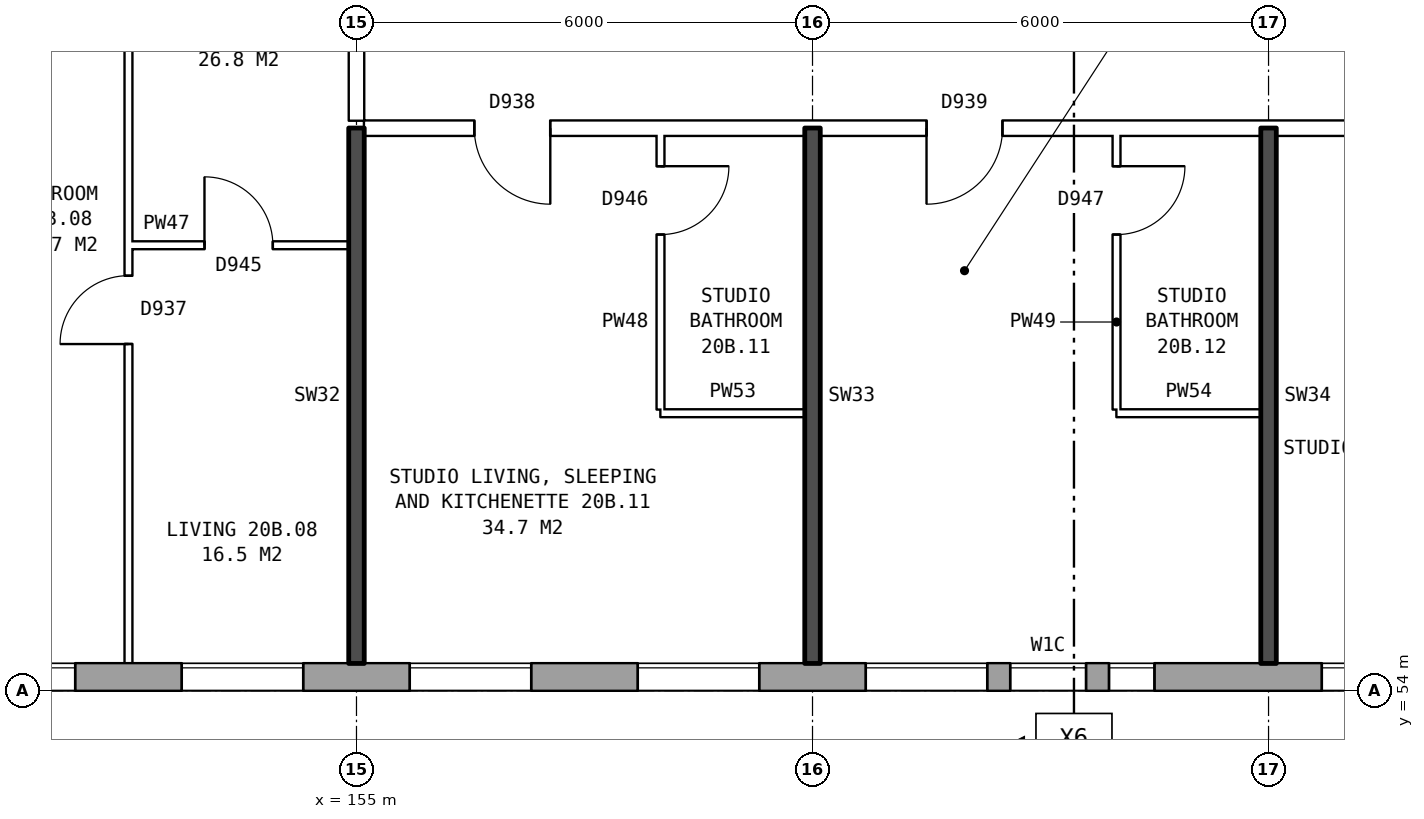
"""IFC4 building model, lengths in metres.
Left out: names, types, materials, properties, quantities, classifications, styles, units other than length and angle.
Written with IfcOpenShell. Run it as: python <this file> out.ifc"""

import sys

from ifc_helpers import new_model, si_unit, direction, frame, frame_2d, origin, place, context, subcontext, project, spatial, rectangle, extrude, element, fill, save


model = new_model("IFC4")
c1 = context("Model", 3, precision=1e-05, world=origin(), true_north=direction((0.0, 1.0)))
c2 = subcontext(c1, "Body", "Model", "MODEL_VIEW")
j1 = project(units=[si_unit("LENGTHUNIT", "METRE"), si_unit("PLANEANGLEUNIT", "RADIAN")], contexts=[c1])
p1 = place(None, origin())
s1 = spatial("IfcSite", under=j1, at=p1, CompositionType="ELEMENT")
p2 = place(p1, origin())
s2 = spatial("IfcBuilding", under=s1, at=p2, CompositionType="ELEMENT")
p3 = place(p2, frame((0.0, 0.0, 74.7)))
s3 = spatial("IfcBuildingStorey", under=s2, at=p3, CompositionType="ELEMENT", Elevation=74.7)
p4 = place(p3, frame((134.075, 54.18, 0.0), z_axis=(0.0, 0.0, 1.0), x_axis=(1.0, 0.0, 0.0)))
e1 = element("IfcWall", 1, at=p4, inside=s3, PredefinedType="STANDARD", context=c2, shape_type="SweptSolid", body=[
    extrude(rectangle(XDim=38.101, YDim=0.36, at=frame_2d((19.05, 0.0))), origin(), (0.0, 0.0, 1.0), 2.85),
])
p5 = place(p4, frame((0.625, 0.0, 0.8)))
e2 = element("IfcOpeningElement", 2, at=p5, cuts=e1, PredefinedType="OPENING", context=c2, shape_type="SweptSolid", body=[
    extrude(rectangle(XDim=1.6, YDim=1.8, at=frame_2d((0.8, 0.9))), frame((0.0, 0.19, 0.0), z_axis=(0.0, -1.0, 0.0), x_axis=(1.0, 0.0, 0.0)), (0.0, 0.0, 1.0), 0.38),
])
p6 = place(p4, frame((3.125, 0.0, 0.8)))
e3 = element("IfcOpeningElement", 3, at=p6, cuts=e1, PredefinedType="OPENING", context=c2, shape_type="SweptSolid", body=[
    extrude(rectangle(XDim=1.2, YDim=1.8, at=frame_2d((0.6, 0.9))), frame((0.0, 0.19, 0.0), z_axis=(0.0, -1.0, 0.0), x_axis=(1.0, 0.0, 0.0)), (0.0, 0.0, 1.0), 0.38),
])
p7 = place(p4, frame((4.625, 0.0, 1.6)))
e4 = element("IfcOpeningElement", 4, at=p7, cuts=e1, PredefinedType="OPENING", context=c2, shape_type="SweptSolid", body=[
    extrude(rectangle(XDim=0.6, YDim=0.9, at=frame_2d((0.3, 0.45))), frame((0.0, 0.19, 0.0), z_axis=(0.0, -1.0, 0.0), x_axis=(1.0, 0.0, 0.0)), (0.0, 0.0, 1.0), 0.38),
])
p8 = place(p4, frame((9.625, 0.0, 0.8)))
e5 = element("IfcOpeningElement", 5, at=p8, cuts=e1, PredefinedType="OPENING", context=c2, shape_type="SweptSolid", body=[
    extrude(rectangle(XDim=1.6, YDim=1.8, at=frame_2d((0.8, 0.9))), frame((0.0, 0.19, 0.0), z_axis=(0.0, -1.0, 0.0), x_axis=(1.0, 0.0, 0.0)), (0.0, 0.0, 1.0), 0.38),
])
p9 = place(p4, frame((12.625, 0.0, 0.8)))
e6 = element("IfcOpeningElement", 6, at=p9, cuts=e1, PredefinedType="OPENING", context=c2, shape_type="SweptSolid", body=[
    extrude(rectangle(XDim=1.6, YDim=1.8, at=frame_2d((0.8, 0.9))), frame((0.0, 0.19, 0.0), z_axis=(0.0, -1.0, 0.0), x_axis=(1.0, 0.0, 0.0)), (0.0, 0.0, 1.0), 0.38),
])
p10 = place(p4, frame((15.625, 0.0, 0.8)))
e7 = element("IfcOpeningElement", 7, at=p10, cuts=e1, PredefinedType="OPENING", context=c2, shape_type="SweptSolid", body=[
    extrude(rectangle(XDim=1.6, YDim=1.8, at=frame_2d((0.8, 0.9))), frame((0.0, 0.19, 0.0), z_axis=(0.0, -1.0, 0.0), x_axis=(1.0, 0.0, 0.0)), (0.0, 0.0, 1.0), 0.38),
])
p11 = place(p4, frame((18.625, 0.0, 0.8)))
e8 = element("IfcOpeningElement", 8, at=p11, cuts=e1, PredefinedType="OPENING", context=c2, shape_type="SweptSolid", body=[
    extrude(rectangle(XDim=1.6, YDim=1.8, at=frame_2d((0.8, 0.9))), frame((0.0, 0.19, 0.0), z_axis=(0.0, -1.0, 0.0), x_axis=(1.0, 0.0, 0.0)), (0.0, 0.0, 1.0), 0.38),
])
p12 = place(p4, frame((21.625, 0.0, 0.8)))
e9 = element("IfcOpeningElement", 9, at=p12, cuts=e1, PredefinedType="OPENING", context=c2, shape_type="SweptSolid", body=[
    extrude(rectangle(XDim=1.6, YDim=1.8, at=frame_2d((0.8, 0.9))), frame((0.0, 0.19, 0.0), z_axis=(0.0, -1.0, 0.0), x_axis=(1.0, 0.0, 0.0)), (0.0, 0.0, 1.0), 0.38),
])
p13 = place(p4, frame((24.625, 0.0, 0.8)))
e10 = element("IfcOpeningElement", 10, at=p13, cuts=e1, PredefinedType="OPENING", context=c2, shape_type="SweptSolid", body=[
    extrude(rectangle(XDim=1.6, YDim=1.8, at=frame_2d((0.8, 0.9))), frame((0.0, 0.19, 0.0), z_axis=(0.0, -1.0, 0.0), x_axis=(1.0, 0.0, 0.0)), (0.0, 0.0, 1.0), 0.38),
])
p14 = place(p4, frame((27.625, 0.0, 0.8)))
e11 = element("IfcOpeningElement", 11, at=p14, cuts=e1, PredefinedType="OPENING", context=c2, shape_type="SweptSolid", body=[
    extrude(rectangle(XDim=1.6, YDim=1.8, at=frame_2d((0.8, 0.9))), frame((0.0, 0.19, 0.0), z_axis=(0.0, -1.0, 0.0), x_axis=(1.0, 0.0, 0.0)), (0.0, 0.0, 1.0), 0.38),
])
p15 = place(p4, frame((29.525, 0.0, 0.8)))
e12 = element("IfcOpeningElement", 12, at=p15, cuts=e1, PredefinedType="OPENING", context=c2, shape_type="SweptSolid", body=[
    extrude(rectangle(XDim=1.0, YDim=1.8, at=frame_2d((0.5, 0.9))), frame((0.0, 0.19, 0.0), z_axis=(0.0, -1.0, 0.0), x_axis=(1.0, 0.0, 0.0)), (0.0, 0.0, 1.0), 0.38),
])
p16 = place(p4, frame((33.625, 0.0, 0.8)))
e13 = element("IfcOpeningElement", 13, at=p16, cuts=e1, PredefinedType="OPENING", context=c2, shape_type="SweptSolid", body=[
    extrude(rectangle(XDim=1.6, YDim=1.8, at=frame_2d((0.8, 0.9))), frame((0.0, 0.19, 0.0), z_axis=(0.0, -1.0, 0.0), x_axis=(1.0, 0.0, 0.0)), (0.0, 0.0, 1.0), 0.38),
])
p17 = place(p4, frame((6.525, 0.0, 0.8)))
e14 = element("IfcOpeningElement", 14, at=p17, cuts=e1, PredefinedType="OPENING", context=c2, shape_type="SweptSolid", body=[
    extrude(rectangle(XDim=0.6, YDim=0.9, at=frame_2d((0.3, 0.45))), frame((0.0, 0.19, 0.0), z_axis=(0.0, -1.0, 0.0), x_axis=(1.0, 0.0, 0.0)), (0.0, 0.0, 1.0), 0.38),
])
p18 = place(p4, frame((7.425, 0.0, 0.8)))
e15 = element("IfcOpeningElement", 15, at=p18, cuts=e1, PredefinedType="OPENING", context=c2, shape_type="SweptSolid", body=[
    extrude(rectangle(XDim=1.2, YDim=1.8, at=frame_2d((0.6, 0.9))), frame((0.0, 0.19, 0.0), z_axis=(0.0, -1.0, 0.0), x_axis=(1.0, 0.0, 0.0)), (0.0, 0.0, 1.0), 0.38),
])
p19 = place(p4, frame((30.825, 0.0, 0.8)))
e16 = element("IfcOpeningElement", 16, at=p19, cuts=e1, PredefinedType="OPENING", context=c2, shape_type="SweptSolid", body=[
    extrude(rectangle(XDim=0.6, YDim=0.9, at=frame_2d((0.3, 0.45))), frame((0.0, 0.19, 0.0), z_axis=(0.0, -1.0, 0.0), x_axis=(1.0, 0.0, 0.0)), (0.0, 0.0, 1.0), 0.38),
])
for number, where, z_axis, x_axis in (
    (17, (159.0, 57.65, 0.0), (0.0, 0.0, 1.0), (1.0, 0.0, 0.0)),
    (18, (165.0, 57.65, 0.0), (0.0, 0.0, 1.0), (1.0, 0.0, 0.0)),
):
    element("IfcWall", number, at=place(p3, frame(where, z_axis=z_axis, x_axis=x_axis)), inside=s3, PredefinedType="PARTITIONING", context=c2, shape_type="SweptSolid", body=[
        extrude(rectangle(XDim=1.9, YDim=0.1, at=frame_2d((0.95, 0.0))), origin(), (0.0, 0.0, 1.0), 2.85),
    ])
p20 = place(p3, frame((152.0, 59.86, 0.0), z_axis=(0.0, 0.0, 1.0), x_axis=(1.0, 0.0, 0.0)))
e19 = element("IfcWall", 19, at=p20, inside=s3, PredefinedType="PARTITIONING", context=c2, shape_type="SweptSolid", body=[
    extrude(rectangle(XDim=2.9, YDim=0.1, at=frame_2d((1.45, 0.0))), origin(), (0.0, 0.0, 1.0), 2.85),
])
p21 = place(p20, frame((1.0, 0.0, 0.0)))
e20 = element("IfcOpeningElement", 20, at=p21, cuts=e19, PredefinedType="OPENING", context=c2, shape_type="SweptSolid", body=[
    extrude(rectangle(XDim=0.9, YDim=2.1, at=frame_2d((0.45, 1.05))), frame((0.0, 0.06, 0.0), z_axis=(0.0, -1.0, 0.0), x_axis=(1.0, 0.0, 0.0)), (0.0, 0.0, 1.0), 0.12),
])
p22 = place(p3, frame((155.1, 61.4, 0.0), z_axis=(0.0, 0.0, 1.0), x_axis=(1.0, 0.0, 0.0)))
e21 = element("IfcWall", 21, at=p22, inside=s3, PredefinedType="PARTITIONING", context=c2, shape_type="SweptSolid", body=[
    extrude(rectangle(XDim=19.79, YDim=0.2, at=frame_2d((9.895, 0.0))), origin(), (0.0, 0.0, 1.0), 2.85),
])
p23 = place(p22, frame((1.45, 0.0, 0.0)))
e22 = element("IfcOpeningElement", 22, at=p23, cuts=e21, PredefinedType="OPENING", context=c2, shape_type="SweptSolid", body=[
    extrude(rectangle(XDim=1.0, YDim=2.1, at=frame_2d((0.5, 1.05))), frame((0.0, 0.11, 0.0), z_axis=(0.0, -1.0, 0.0), x_axis=(1.0, 0.0, 0.0)), (0.0, 0.0, 1.0), 0.22),
])
p24 = place(p22, frame((7.4, 0.0, 0.0)))
e23 = element("IfcOpeningElement", 23, at=p24, cuts=e21, PredefinedType="OPENING", context=c2, shape_type="SweptSolid", body=[
    extrude(rectangle(XDim=1.0, YDim=2.1, at=frame_2d((0.5, 1.05))), frame((0.0, 0.11, 0.0), z_axis=(0.0, -1.0, 0.0), x_axis=(1.0, 0.0, 0.0)), (0.0, 0.0, 1.0), 0.22),
])
p25 = place(p22, frame((13.2, 0.0, 0.0)))
e24 = element("IfcOpeningElement", 24, at=p25, cuts=e21, PredefinedType="OPENING", context=c2, shape_type="SweptSolid", body=[
    extrude(rectangle(XDim=1.0, YDim=2.1, at=frame_2d((0.5, 1.05))), frame((0.0, 0.11, 0.0), z_axis=(0.0, -1.0, 0.0), x_axis=(1.0, 0.0, 0.0)), (0.0, 0.0, 1.0), 0.22),
])
p26 = place(p3, frame((152.0, 54.36, 0.0), z_axis=(0.0, 0.0, 1.0), x_axis=(0.0, 1.0, 0.0)))
e25 = element("IfcWall", 25, at=p26, inside=s3, PredefinedType="PARTITIONING", context=c2, shape_type="SweptSolid", body=[
    extrude(rectangle(XDim=14.34, YDim=0.1, at=frame_2d((7.17, 0.0))), origin(), (0.0, 0.0, 1.0), 2.85),
])
p27 = place(p26, frame((4.2, 0.0, 0.0)))
e26 = element("IfcOpeningElement", 26, at=p27, cuts=e25, PredefinedType="OPENING", context=c2, shape_type="SweptSolid", body=[
    extrude(rectangle(XDim=0.9, YDim=2.1, at=frame_2d((0.45, 1.05))), frame((0.0, 0.06, 0.0), z_axis=(0.0, -1.0, 0.0), x_axis=(1.0, 0.0, 0.0)), (0.0, 0.0, 1.0), 0.12),
])
p28 = place(p26, frame((13.04, 0.0, 0.0)))
e27 = element("IfcOpeningElement", 27, at=p28, cuts=e25, PredefinedType="OPENING", context=c2, shape_type="SweptSolid", body=[
    extrude(rectangle(XDim=0.9, YDim=2.1, at=frame_2d((0.45, 1.05))), frame((0.0, 0.06, 0.0), z_axis=(0.0, -1.0, 0.0), x_axis=(1.0, 0.0, 0.0)), (0.0, 0.0, 1.0), 0.12),
])
p29 = place(p3, frame((155.0, 54.36, 0.0), z_axis=(0.0, 0.0, 1.0), x_axis=(0.0, 1.0, 0.0)))
e28 = element("IfcWall", 28, at=p29, inside=s3, PredefinedType="SOLIDWALL", context=c2, shape_type="SweptSolid", body=[
    extrude(rectangle(XDim=7.04, YDim=0.2, at=frame_2d((3.52, 0.0))), origin(), (0.0, 0.0, 1.0), 2.85),
])
p30 = place(p3, frame((155.0, 61.5, 0.0), z_axis=(0.0, 0.0, 1.0), x_axis=(0.0, 1.0, 0.0)))
e29 = element("IfcWall", 29, at=p30, inside=s3, PredefinedType="PARTITIONING", context=c2, shape_type="SweptSolid", body=[
    extrude(rectangle(XDim=2.2, YDim=0.2, at=frame_2d((1.1, 0.0))), origin(), (0.0, 0.0, 1.0), 2.85),
])
p31 = place(p3, frame((159.0, 57.7, 0.0), z_axis=(0.0, 0.0, 1.0), x_axis=(0.0, 1.0, 0.0)))
e30 = element("IfcWall", 30, at=p31, inside=s3, PredefinedType="PARTITIONING", context=c2, shape_type="SweptSolid", body=[
    extrude(rectangle(XDim=3.6, YDim=0.1, at=frame_2d((1.8, 0.0))), origin(), (0.0, 0.0, 1.0), 2.85),
])
p32 = place(p31, frame((2.3, 0.0, 0.0)))
e31 = element("IfcOpeningElement", 31, at=p32, cuts=e30, PredefinedType="OPENING", context=c2, shape_type="SweptSolid", body=[
    extrude(rectangle(XDim=0.9, YDim=2.1, at=frame_2d((0.45, 1.05))), frame((0.0, 0.06, 0.0), z_axis=(0.0, -1.0, 0.0), x_axis=(1.0, 0.0, 0.0)), (0.0, 0.0, 1.0), 0.12),
])
p33 = place(p3, frame((161.0, 54.36, 0.0), z_axis=(0.0, 0.0, 1.0), x_axis=(0.0, 1.0, 0.0)))
e32 = element("IfcWall", 32, at=p33, inside=s3, PredefinedType="SOLIDWALL", context=c2, shape_type="SweptSolid", body=[
    extrude(rectangle(XDim=7.04, YDim=0.2, at=frame_2d((3.52, 0.0))), origin(), (0.0, 0.0, 1.0), 2.85),
])
p34 = place(p3, frame((165.0, 57.7, 0.0), z_axis=(0.0, 0.0, 1.0), x_axis=(0.0, 1.0, 0.0)))
e33 = element("IfcWall", 33, at=p34, inside=s3, PredefinedType="PARTITIONING", context=c2, shape_type="SweptSolid", body=[
    extrude(rectangle(XDim=3.6, YDim=0.1, at=frame_2d((1.8, 0.0))), origin(), (0.0, 0.0, 1.0), 2.85),
])
p35 = place(p34, frame((2.3, 0.0, 0.0)))
e34 = element("IfcOpeningElement", 34, at=p35, cuts=e33, PredefinedType="OPENING", context=c2, shape_type="SweptSolid", body=[
    extrude(rectangle(XDim=0.9, YDim=2.1, at=frame_2d((0.45, 1.05))), frame((0.0, 0.06, 0.0), z_axis=(0.0, -1.0, 0.0), x_axis=(1.0, 0.0, 0.0)), (0.0, 0.0, 1.0), 0.12),
])
p36 = place(p3, frame((167.0, 54.36, 0.0), z_axis=(0.0, 0.0, 1.0), x_axis=(0.0, 1.0, 0.0)))
e35 = element("IfcWall", 35, at=p36, inside=s3, PredefinedType="SOLIDWALL", context=c2, shape_type="SweptSolid", body=[
    extrude(rectangle(XDim=7.04, YDim=0.2, at=frame_2d((3.52, 0.0))), origin(), (0.0, 0.0, 1.0), 2.85),
])
p37 = place(p10, origin())
e36 = element("IfcWindow", 36, at=p37, inside=s3, PartitioningType="SINGLE_PANEL", PredefinedType="WINDOW", context=c2, shape_type="SweptSolid", body=[
    extrude(rectangle(XDim=1.6, YDim=1.8, at=frame_2d((0.8, 0.9))), frame((0.0, 0.15, 0.0), z_axis=(0.0, -1.0, 0.0), x_axis=(1.0, 0.0, 0.0)), (0.0, 0.0, 1.0), 0.06),
])
fill(e7, e36)
p38 = place(p11, origin())
e37 = element("IfcWindow", 37, at=p38, inside=s3, PartitioningType="SINGLE_PANEL", PredefinedType="WINDOW", context=c2, shape_type="SweptSolid", body=[
    extrude(rectangle(XDim=1.6, YDim=1.8, at=frame_2d((0.8, 0.9))), frame((0.0, 0.15, 0.0), z_axis=(0.0, -1.0, 0.0), x_axis=(1.0, 0.0, 0.0)), (0.0, 0.0, 1.0), 0.06),
])
fill(e8, e37)
p39 = place(p12, origin())
e38 = element("IfcWindow", 38, at=p39, inside=s3, PartitioningType="SINGLE_PANEL", PredefinedType="WINDOW", context=c2, shape_type="SweptSolid", body=[
    extrude(rectangle(XDim=1.6, YDim=1.8, at=frame_2d((0.8, 0.9))), frame((0.0, 0.15, 0.0), z_axis=(0.0, -1.0, 0.0), x_axis=(1.0, 0.0, 0.0)), (0.0, 0.0, 1.0), 0.06),
])
fill(e9, e38)
p40 = place(p13, origin())
e39 = element("IfcWindow", 39, at=p40, inside=s3, PartitioningType="SINGLE_PANEL", PredefinedType="WINDOW", context=c2, shape_type="SweptSolid", body=[
    extrude(rectangle(XDim=1.6, YDim=1.8, at=frame_2d((0.8, 0.9))), frame((0.0, 0.15, 0.0), z_axis=(0.0, -1.0, 0.0), x_axis=(1.0, 0.0, 0.0)), (0.0, 0.0, 1.0), 0.06),
])
fill(e10, e39)
p41 = place(p14, origin())
e40 = element("IfcWindow", 40, at=p41, inside=s3, PartitioningType="SINGLE_PANEL", PredefinedType="WINDOW", context=c2, shape_type="SweptSolid", body=[
    extrude(rectangle(XDim=1.6, YDim=1.8, at=frame_2d((0.8, 0.9))), frame((0.0, 0.15, 0.0), z_axis=(0.0, -1.0, 0.0), x_axis=(1.0, 0.0, 0.0)), (0.0, 0.0, 1.0), 0.06),
])
fill(e11, e40)
p42 = place(p15, origin())
e41 = element("IfcWindow", 41, at=p42, inside=s3, PartitioningType="SINGLE_PANEL", PredefinedType="WINDOW", context=c2, shape_type="SweptSolid", body=[
    extrude(rectangle(XDim=1.0, YDim=1.8, at=frame_2d((0.5, 0.9))), frame((0.0, 0.15, 0.0), z_axis=(0.0, -1.0, 0.0), x_axis=(1.0, 0.0, 0.0)), (0.0, 0.0, 1.0), 0.06),
])
fill(e12, e41)
p43 = place(p16, origin())
e42 = element("IfcWindow", 42, at=p43, inside=s3, PartitioningType="SINGLE_PANEL", PredefinedType="WINDOW", context=c2, shape_type="SweptSolid", body=[
    extrude(rectangle(XDim=1.6, YDim=1.8, at=frame_2d((0.8, 0.9))), frame((0.0, 0.15, 0.0), z_axis=(0.0, -1.0, 0.0), x_axis=(1.0, 0.0, 0.0)), (0.0, 0.0, 1.0), 0.06),
])
fill(e13, e42)
p44 = place(p27, origin())
e43 = element("IfcDoor", 43, at=p44, inside=s3, OperationType="SINGLE_SWING_LEFT", PredefinedType="DOOR", context=c2, shape_type="SweptSolid", body=[
    extrude(rectangle(XDim=0.9, YDim=2.1, at=frame_2d((0.45, 1.05))), frame((0.0, 0.025, 0.0), z_axis=(0.0, -1.0, 0.0), x_axis=(1.0, 0.0, 0.0)), (0.0, 0.0, 1.0), 0.05),
])
fill(e26, e43)
p45 = place(p21, origin())
e44 = element("IfcDoor", 44, at=p45, inside=s3, OperationType="SINGLE_SWING_LEFT", PredefinedType="DOOR", context=c2, shape_type="SweptSolid", body=[
    extrude(rectangle(XDim=0.9, YDim=2.1, at=frame_2d((0.45, 1.05))), frame((0.0, 0.025, 0.0), z_axis=(0.0, -1.0, 0.0), x_axis=(1.0, 0.0, 0.0)), (0.0, 0.0, 1.0), 0.05),
])
fill(e20, e44)
p46 = place(p23, frame((1.0, 0.0, 0.0), z_axis=(0.0, 0.0, 1.0), x_axis=(-1.0, 0.0, 0.0)))
e45 = element("IfcDoor", 45, at=p46, inside=s3, OperationType="SINGLE_SWING_LEFT", PredefinedType="DOOR", context=c2, shape_type="SweptSolid", body=[
    extrude(rectangle(XDim=1.0, YDim=2.1, at=frame_2d((0.5, 1.05))), frame((0.0, 0.025, 0.0), z_axis=(0.0, -1.0, 0.0), x_axis=(1.0, 0.0, 0.0)), (0.0, 0.0, 1.0), 0.05),
])
fill(e22, e45)
p47 = place(p32, frame((0.9, 0.0, 0.0), z_axis=(0.0, 0.0, 1.0), x_axis=(-1.0, 0.0, 0.0)))
e46 = element("IfcDoor", 46, at=p47, inside=s3, OperationType="SINGLE_SWING_LEFT", PredefinedType="DOOR", context=c2, shape_type="SweptSolid", body=[
    extrude(rectangle(XDim=0.9, YDim=2.1, at=frame_2d((0.45, 1.05))), frame((0.0, 0.025, 0.0), z_axis=(0.0, -1.0, 0.0), x_axis=(1.0, 0.0, 0.0)), (0.0, 0.0, 1.0), 0.05),
])
fill(e31, e46)
p48 = place(p24, frame((1.0, 0.0, 0.0), z_axis=(0.0, 0.0, 1.0), x_axis=(-1.0, 0.0, 0.0)))
e47 = element("IfcDoor", 47, at=p48, inside=s3, OperationType="SINGLE_SWING_RIGHT", PredefinedType="DOOR", context=c2, shape_type="SweptSolid", body=[
    extrude(rectangle(XDim=1.0, YDim=2.1, at=frame_2d((0.5, 1.05))), frame((0.0, 0.025, 0.0), z_axis=(0.0, -1.0, 0.0), x_axis=(1.0, 0.0, 0.0)), (0.0, 0.0, 1.0), 0.05),
])
fill(e23, e47)
p49 = place(p35, frame((0.9, 0.0, 0.0), z_axis=(0.0, 0.0, 1.0), x_axis=(-1.0, 0.0, 0.0)))
e48 = element("IfcDoor", 48, at=p49, inside=s3, OperationType="SINGLE_SWING_LEFT", PredefinedType="DOOR", context=c2, shape_type="SweptSolid", body=[
    extrude(rectangle(XDim=0.9, YDim=2.1, at=frame_2d((0.45, 1.05))), frame((0.0, 0.025, 0.0), z_axis=(0.0, -1.0, 0.0), x_axis=(1.0, 0.0, 0.0)), (0.0, 0.0, 1.0), 0.05),
])
fill(e34, e48)
p50 = place(p19, origin())
e49 = element("IfcWindow", 49, at=p50, inside=s3, PartitioningType="SINGLE_PANEL", PredefinedType="WINDOW", context=c2, shape_type="SweptSolid", body=[
    extrude(rectangle(XDim=0.6, YDim=0.9, at=frame_2d((0.3, 0.45))), frame((0.0, 0.15, 0.0), z_axis=(0.0, -1.0, 0.0), x_axis=(1.0, 0.0, 0.0)), (0.0, 0.0, 1.0), 0.06),
])
fill(e16, e49)
save(model, sys.argv[1])
